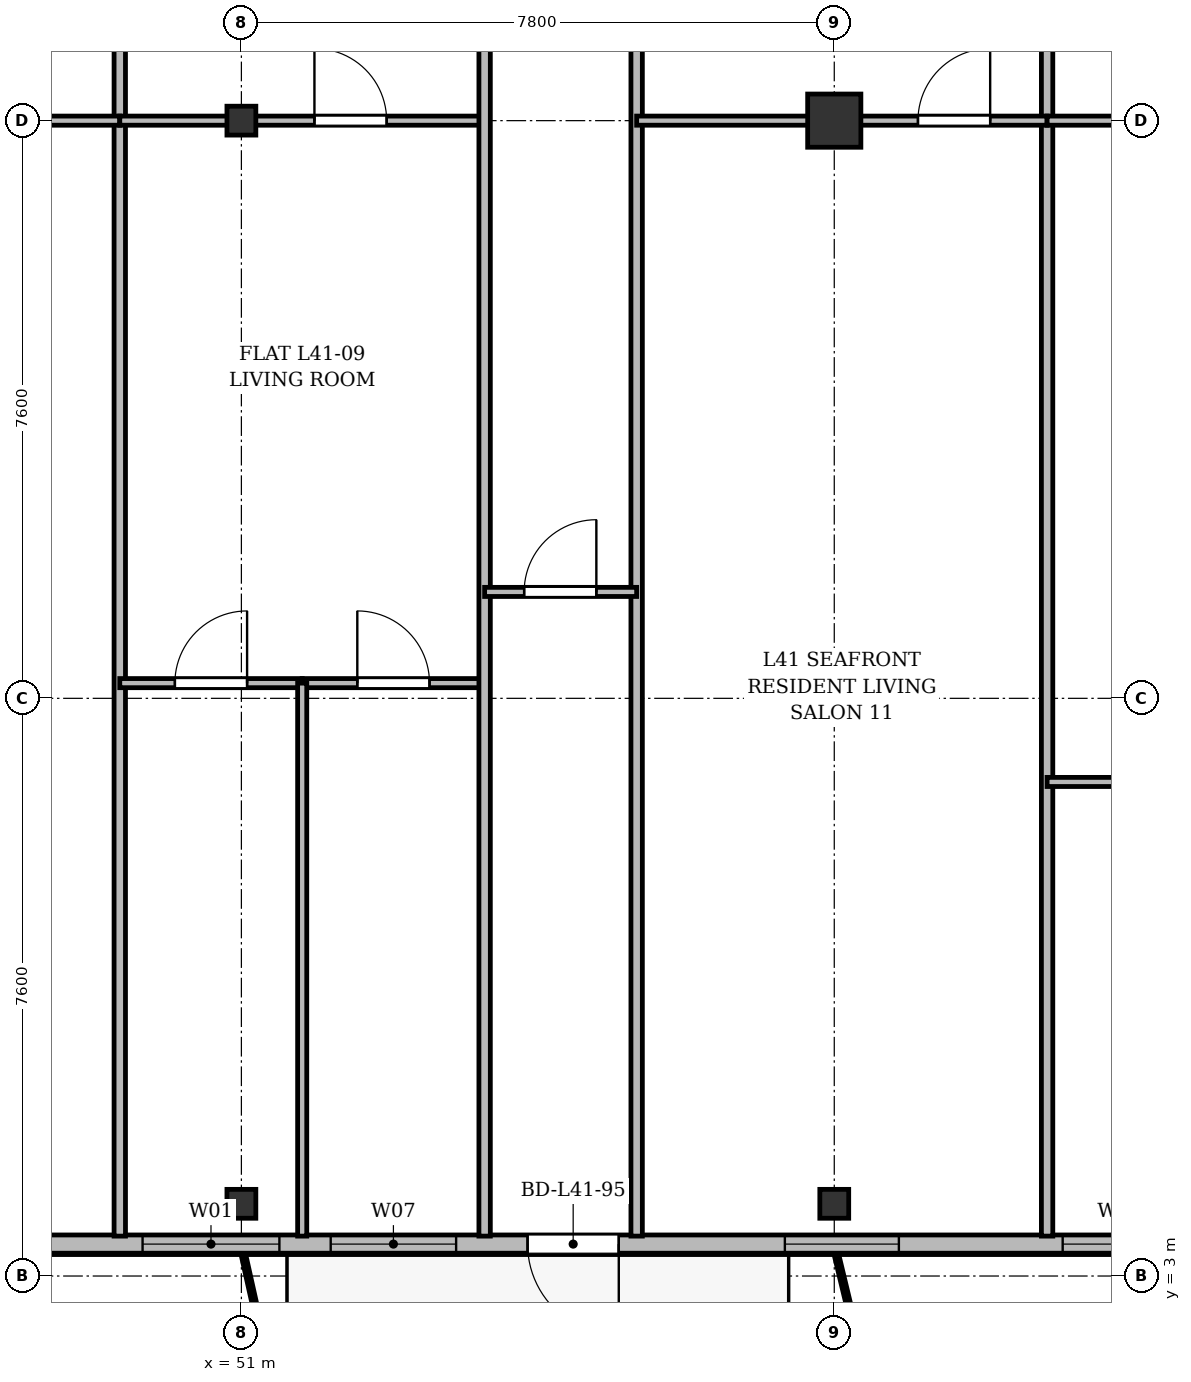
"""IFC4 building model, lengths in metres.
Left out: names, types, materials, properties, quantities, classifications, styles, units other than length and angle.
Written with IfcOpenShell. Run it as: python <this file> out.ifc"""

import sys

from ifc_helpers import new_model, si_unit, direction, frame, frame_2d, origin, origin_2d, place, context, subcontext, project, spatial, rectangle, i_section, extrude, source, transform, mapped, element, fill, save


model = new_model("IFC4")
c1 = context("Model", 3, precision=1e-05, world=origin(), true_north=direction((0.0, 1.0)))
c2 = subcontext(c1, "Body", "Model", "MODEL_VIEW")
j1 = project(units=[si_unit("LENGTHUNIT", "METRE"), si_unit("PLANEANGLEUNIT", "RADIAN")], contexts=[c1])
p1 = place(None, origin())
s1 = spatial("IfcSite", under=j1, at=p1, CompositionType="ELEMENT")
p2 = place(p1, origin())
s2 = spatial("IfcBuilding", under=s1, at=p2, CompositionType="ELEMENT")
p3 = place(p2, frame((0.0, 0.0, 157.3)))
s3 = spatial("IfcBuildingStorey", under=s2, at=p3, CompositionType="ELEMENT", Elevation=157.3)
m1 = source(origin(), c2, "Body", "SweptSolid", [
    extrude(i_section(OverallWidth=0.38, OverallDepth=0.38, WebThickness=0.02, FlangeThickness=0.03, at=origin_2d()), origin(), (0.0, 0.0, 1.0), 3.6),
])
for number, where, z_axis, x_axis in (
    (1, (51.0, 3.95, 0.0), (0.0, 0.0, 1.0), (1.0, 0.0, 0.0)),
    (2, (51.0, 18.2, 0.0), (0.0, 0.0, 1.0), (1.0, 0.0, 0.0)),
    (3, (58.8, 3.95, 0.0), (0.0, 0.0, 1.0), (1.0, 0.0, 0.0)),
):
    element("IfcColumn", number, at=place(p3, frame(where, z_axis=z_axis, x_axis=x_axis)), inside=s3, PredefinedType="COLUMN", context=c2, shape_type="MappedRepresentation", body=[
        mapped(m1, transform((0.0, 0.0, 0.0), x_axis=(1.0, 0.0, 0.0), y_axis=(0.0, 1.0, 0.0), z_axis=(0.0, 0.0, 1.0), scale=1.0)),
    ])
m2 = source(origin(), c2, "Body", "SweptSolid", [
    extrude(rectangle(XDim=0.7, YDim=0.7, at=origin_2d()), origin(), (0.0, 0.0, 1.0), 3.6),
])
p4 = place(p3, frame((58.8, 18.2, 0.0), z_axis=(0.0, 0.0, 1.0), x_axis=(1.0, 0.0, 0.0)))
e4 = element("IfcColumn", 4, at=p4, inside=s3, PredefinedType="COLUMN", context=c2, shape_type="MappedRepresentation", body=[
    mapped(m2, transform((0.0, 0.0, 0.0), x_axis=(1.0, 0.0, 0.0), y_axis=(0.0, 1.0, 0.0), z_axis=(0.0, 0.0, 1.0), scale=1.0)),
])
p5 = place(p3, frame((63.6, 3.42, 0.0), z_axis=(0.0, 0.0, 1.0), x_axis=(-1.0, 0.0, 0.0)))
e5 = element("IfcWall", 5, at=p5, inside=s3, PredefinedType="SOLIDWALL", context=c2, shape_type="SweptSolid", body=[
    extrude(rectangle(XDim=52.8, YDim=0.24, at=frame_2d((26.4, 0.0))), origin(), (0.0, 0.0, 1.0), 3.35),
])
p6 = place(p5, frame((0.295, 0.0, 0.9)))
e6 = element("IfcOpeningElement", 6, at=p6, cuts=e5, PredefinedType="OPENING", context=c2, shape_type="SweptSolid", body=[
    extrude(rectangle(XDim=1.5, YDim=1.75, at=frame_2d((0.75, 0.875))), frame((0.0, 0.13, 0.0), z_axis=(0.0, -1.0, 0.0), x_axis=(1.0, 0.0, 0.0)), (0.0, 0.0, 1.0), 0.26),
])
p7 = place(p5, frame((3.95, 0.0, 0.9)))
e7 = element("IfcOpeningElement", 7, at=p7, cuts=e5, PredefinedType="OPENING", context=c2, shape_type="SweptSolid", body=[
    extrude(rectangle(XDim=1.5, YDim=1.75, at=frame_2d((0.75, 0.875))), frame((0.0, 0.13, 0.0), z_axis=(0.0, -1.0, 0.0), x_axis=(1.0, 0.0, 0.0)), (0.0, 0.0, 1.0), 0.26),
])
p8 = place(p5, frame((7.635, 0.0, 0.0)))
e8 = element("IfcOpeningElement", 8, at=p8, cuts=e5, PredefinedType="OPENING", context=c2, shape_type="SweptSolid", body=[
    extrude(rectangle(XDim=1.2, YDim=2.2, at=frame_2d((0.6, 1.1))), frame((0.0, 0.13, 0.0), z_axis=(0.0, -1.0, 0.0), x_axis=(1.0, 0.0, 0.0)), (0.0, 0.0, 1.0), 0.26),
])
p9 = place(p5, frame((9.775, 0.0, 0.9)))
e9 = element("IfcOpeningElement", 9, at=p9, cuts=e5, PredefinedType="OPENING", context=c2, shape_type="SweptSolid", body=[
    extrude(rectangle(XDim=1.65, YDim=1.85, at=frame_2d((0.825, 0.925))), frame((0.0, 0.13, 0.0), z_axis=(0.0, -1.0, 0.0), x_axis=(1.0, 0.0, 0.0)), (0.0, 0.0, 1.0), 0.26),
])
p10 = place(p5, frame((12.1, 0.0, 0.9)))
e10 = element("IfcOpeningElement", 10, at=p10, cuts=e5, PredefinedType="OPENING", context=c2, shape_type="SweptSolid", body=[
    extrude(rectangle(XDim=1.8, YDim=1.8, at=frame_2d((0.9, 0.9))), frame((0.0, 0.13, 0.0), z_axis=(0.0, -1.0, 0.0), x_axis=(1.0, 0.0, 0.0)), (0.0, 0.0, 1.0), 0.26),
])
p11 = place(p5, frame((15.9, 0.0, 0.9)))
e11 = element("IfcOpeningElement", 11, at=p11, cuts=e5, PredefinedType="OPENING", context=c2, shape_type="SweptSolid", body=[
    extrude(rectangle(XDim=2.2, YDim=1.8, at=frame_2d((1.1, 0.9))), frame((0.0, 0.13, 0.0), z_axis=(0.0, -1.0, 0.0), x_axis=(1.0, 0.0, 0.0)), (0.0, 0.0, 1.0), 0.26),
])
p12 = place(p5, frame((22.65, 0.0, 0.9)))
e12 = element("IfcOpeningElement", 12, at=p12, cuts=e5, PredefinedType="OPENING", context=c2, shape_type="SweptSolid", body=[
    extrude(rectangle(XDim=1.5, YDim=1.75, at=frame_2d((0.75, 0.875))), frame((0.0, 0.13, 0.0), z_axis=(0.0, -1.0, 0.0), x_axis=(1.0, 0.0, 0.0)), (0.0, 0.0, 1.0), 0.26),
])
p13 = place(p5, frame((27.5, 0.0, 0.9)))
e13 = element("IfcOpeningElement", 13, at=p13, cuts=e5, PredefinedType="OPENING", context=c2, shape_type="SweptSolid", body=[
    extrude(rectangle(XDim=2.0, YDim=1.95, at=frame_2d((1.0, 0.975))), frame((0.0, 0.13, 0.0), z_axis=(0.0, -1.0, 0.0), x_axis=(1.0, 0.0, 0.0)), (0.0, 0.0, 1.0), 0.26),
])
p14 = place(p5, frame((30.675, 0.0, 0.9)))
e14 = element("IfcOpeningElement", 14, at=p14, cuts=e5, PredefinedType="OPENING", context=c2, shape_type="SweptSolid", body=[
    extrude(rectangle(XDim=1.65, YDim=1.85, at=frame_2d((0.825, 0.925))), frame((0.0, 0.13, 0.0), z_axis=(0.0, -1.0, 0.0), x_axis=(1.0, 0.0, 0.0)), (0.0, 0.0, 1.0), 0.26),
])
p15 = place(p5, frame((34.3, 0.0, 0.9)))
e15 = element("IfcOpeningElement", 15, at=p15, cuts=e5, PredefinedType="OPENING", context=c2, shape_type="SweptSolid", body=[
    extrude(rectangle(XDim=1.8, YDim=1.8, at=frame_2d((0.9, 0.9))), frame((0.0, 0.13, 0.0), z_axis=(0.0, -1.0, 0.0), x_axis=(1.0, 0.0, 0.0)), (0.0, 0.0, 1.0), 0.26),
])
p16 = place(p5, frame((39.3, 0.0, 0.9)))
e16 = element("IfcOpeningElement", 16, at=p16, cuts=e5, PredefinedType="OPENING", context=c2, shape_type="SweptSolid", body=[
    extrude(rectangle(XDim=2.2, YDim=1.8, at=frame_2d((1.1, 0.9))), frame((0.0, 0.13, 0.0), z_axis=(0.0, -1.0, 0.0), x_axis=(1.0, 0.0, 0.0)), (0.0, 0.0, 1.0), 0.26),
])
p17 = place(p5, frame((43.65, 0.0, 0.9)))
e17 = element("IfcOpeningElement", 17, at=p17, cuts=e5, PredefinedType="OPENING", context=c2, shape_type="SweptSolid", body=[
    extrude(rectangle(XDim=1.5, YDim=1.75, at=frame_2d((0.75, 0.875))), frame((0.0, 0.13, 0.0), z_axis=(0.0, -1.0, 0.0), x_axis=(1.0, 0.0, 0.0)), (0.0, 0.0, 1.0), 0.26),
])
p18 = place(p5, frame((47.1, 0.0, 0.9)))
e18 = element("IfcOpeningElement", 18, at=p18, cuts=e5, PredefinedType="OPENING", context=c2, shape_type="SweptSolid", body=[
    extrude(rectangle(XDim=2.0, YDim=1.95, at=frame_2d((1.0, 0.975))), frame((0.0, 0.13, 0.0), z_axis=(0.0, -1.0, 0.0), x_axis=(1.0, 0.0, 0.0)), (0.0, 0.0, 1.0), 0.26),
])
p19 = place(p5, frame((51.005, 0.0, 0.9)))
e19 = element("IfcOpeningElement", 19, at=p19, cuts=e5, PredefinedType="OPENING", context=c2, shape_type="SweptSolid", body=[
    extrude(rectangle(XDim=1.5, YDim=1.75, at=frame_2d((0.75, 0.875))), frame((0.0, 0.13, 0.0), z_axis=(0.0, -1.0, 0.0), x_axis=(1.0, 0.0, 0.0)), (0.0, 0.0, 1.0), 0.26),
])
p20 = place(p5, frame((37.85, 0.0, 0.0)))
e20 = element("IfcOpeningElement", 20, at=p20, cuts=e5, PredefinedType="OPENING", context=c2, shape_type="SweptSolid", body=[
    extrude(rectangle(XDim=1.2, YDim=2.2, at=frame_2d((0.6, 1.1))), frame((0.0, 0.13, 0.0), z_axis=(0.0, -1.0, 0.0), x_axis=(1.0, 0.0, 0.0)), (0.0, 0.0, 1.0), 0.26),
])
for number, where, z_axis, x_axis in (
    (21, (49.4, 3.525, 0.0), (0.0, 0.0, 1.0), (0.0, 1.0, 0.0)),
    (22, (61.6, 3.525, 0.0), (0.0, 0.0, 1.0), (0.0, 1.0, 0.0)),
):
    element("IfcWall", number, at=place(p3, frame(where, z_axis=z_axis, x_axis=x_axis)), inside=s3, PredefinedType="PARTITIONING", context=c2, shape_type="SweptSolid", body=[
        extrude(rectangle(XDim=27.275, YDim=0.15, at=frame_2d((13.638, 0.0))), origin(), (0.0, 0.0, 1.0), 2.75),
    ])
p21 = place(p3, frame((43.8, 18.2, 0.0), z_axis=(0.0, 0.0, 1.0), x_axis=(1.0, 0.0, 0.0)))
e23 = element("IfcWall", 23, at=p21, inside=s3, PredefinedType="PARTITIONING", context=c2, shape_type="SweptSolid", body=[
    extrude(rectangle(XDim=5.6, YDim=0.12, at=frame_2d((2.8, 0.0))), origin(), (0.0, 0.0, 1.0), 2.75),
])
p22 = place(p21, frame((2.418, 0.0, 0.0)))
e24 = element("IfcOpeningElement", 24, at=p22, cuts=e23, PredefinedType="OPENING", context=c2, shape_type="SweptSolid", body=[
    extrude(rectangle(XDim=0.95, YDim=2.15, at=frame_2d((0.475, 1.075))), frame((0.0, 0.07, 0.0), z_axis=(0.0, -1.0, 0.0), x_axis=(1.0, 0.0, 0.0)), (0.0, 0.0, 1.0), 0.14),
])
p23 = place(p3, frame((49.4, 18.2, 0.0), z_axis=(0.0, 0.0, 1.0), x_axis=(1.0, 0.0, 0.0)))
e25 = element("IfcWall", 25, at=p23, inside=s3, PredefinedType="PARTITIONING", context=c2, shape_type="SweptSolid", body=[
    extrude(rectangle(XDim=4.8, YDim=0.12, at=frame_2d((2.4, 0.0))), origin(), (0.0, 0.0, 1.0), 2.75),
])
p24 = place(p23, frame((2.561, 0.0, 0.0)))
e26 = element("IfcOpeningElement", 26, at=p24, cuts=e25, PredefinedType="OPENING", context=c2, shape_type="SweptSolid", body=[
    extrude(rectangle(XDim=0.95, YDim=2.15, at=frame_2d((0.475, 1.075))), frame((0.0, 0.07, 0.0), z_axis=(0.0, -1.0, 0.0), x_axis=(1.0, 0.0, 0.0)), (0.0, 0.0, 1.0), 0.14),
])
p25 = place(p3, frame((49.4, 10.8, 0.0), z_axis=(0.0, 0.0, 1.0), x_axis=(1.0, 0.0, 0.0)))
e27 = element("IfcWall", 27, at=p25, inside=s3, PredefinedType="PARTITIONING", context=c2, shape_type="SweptSolid", body=[
    extrude(rectangle(XDim=2.4, YDim=0.12, at=frame_2d((1.2, 0.0))), origin(), (0.0, 0.0, 1.0), 2.85),
])
p26 = place(p25, frame((0.725, 0.0, 0.0)))
e28 = element("IfcOpeningElement", 28, at=p26, cuts=e27, PredefinedType="OPENING", context=c2, shape_type="SweptSolid", body=[
    extrude(rectangle(XDim=0.95, YDim=2.15, at=frame_2d((0.475, 1.075))), frame((0.0, 0.07, 0.0), z_axis=(0.0, -1.0, 0.0), x_axis=(1.0, 0.0, 0.0)), (0.0, 0.0, 1.0), 0.14),
])
p27 = place(p3, frame((51.8, 10.8, 0.0), z_axis=(0.0, 0.0, 1.0), x_axis=(1.0, 0.0, 0.0)))
e29 = element("IfcWall", 29, at=p27, inside=s3, PredefinedType="PARTITIONING", context=c2, shape_type="SweptSolid", body=[
    extrude(rectangle(XDim=2.4, YDim=0.12, at=frame_2d((1.2, 0.0))), origin(), (0.0, 0.0, 1.0), 3.35),
])
p28 = place(p27, frame((0.725, 0.0, 0.0)))
e30 = element("IfcOpeningElement", 30, at=p28, cuts=e29, PredefinedType="OPENING", context=c2, shape_type="SweptSolid", body=[
    extrude(rectangle(XDim=0.95, YDim=2.15, at=frame_2d((0.475, 1.075))), frame((0.0, 0.07, 0.0), z_axis=(0.0, -1.0, 0.0), x_axis=(1.0, 0.0, 0.0)), (0.0, 0.0, 1.0), 0.14),
])
p29 = place(p3, frame((51.8, 3.525, 0.0), z_axis=(0.0, 0.0, 1.0), x_axis=(0.0, 1.0, 0.0)))
e31 = element("IfcWall", 31, at=p29, inside=s3, PredefinedType="PARTITIONING", context=c2, shape_type="SweptSolid", body=[
    extrude(rectangle(XDim=7.275, YDim=0.12, at=frame_2d((3.638, 0.0))), origin(), (0.0, 0.0, 1.0), 2.75),
])
for number, where, z_axis, x_axis in (
    (32, (54.2, 3.525, 0.0), (0.0, 0.0, 1.0), (0.0, 1.0, 0.0)),
    (33, (56.2, 3.525, 0.0), (0.0, 0.0, 1.0), (0.0, 1.0, 0.0)),
):
    element("IfcWall", number, at=place(p3, frame(where, z_axis=z_axis, x_axis=x_axis)), inside=s3, PredefinedType="PARTITIONING", context=c2, shape_type="SweptSolid", body=[
        extrude(rectangle(XDim=27.275, YDim=0.15, at=frame_2d((13.638, 0.0))), origin(), (0.0, 0.0, 1.0), 2.75),
    ])
p30 = place(p3, frame((54.2, 12.0, 0.0), z_axis=(0.0, 0.0, 1.0), x_axis=(1.0, 0.0, 0.0)))
e34 = element("IfcWall", 34, at=p30, inside=s3, PredefinedType="PARTITIONING", context=c2, shape_type="SweptSolid", body=[
    extrude(rectangle(XDim=2.0, YDim=0.12, at=frame_2d((1.0, 0.0))), origin(), (0.0, 0.0, 1.0), 3.35),
])
p31 = place(p30, frame((0.52, 0.0, 0.0)))
e35 = element("IfcOpeningElement", 35, at=p31, cuts=e34, PredefinedType="OPENING", context=c2, shape_type="SweptSolid", body=[
    extrude(rectangle(XDim=0.95, YDim=2.15, at=frame_2d((0.475, 1.075))), frame((0.0, 0.07, 0.0), z_axis=(0.0, -1.0, 0.0), x_axis=(1.0, 0.0, 0.0)), (0.0, 0.0, 1.0), 0.14),
])
p32 = place(p3, frame((56.2, 18.2, 0.0), z_axis=(0.0, 0.0, 1.0), x_axis=(1.0, 0.0, 0.0)))
e36 = element("IfcWall", 36, at=p32, inside=s3, PredefinedType="PARTITIONING", context=c2, shape_type="SweptSolid", body=[
    extrude(rectangle(XDim=5.4, YDim=0.12, at=frame_2d((2.7, 0.0))), origin(), (0.0, 0.0, 1.0), 2.75),
])
p33 = place(p32, frame((3.701, 0.0, 0.0)))
e37 = element("IfcOpeningElement", 37, at=p33, cuts=e36, PredefinedType="OPENING", context=c2, shape_type="SweptSolid", body=[
    extrude(rectangle(XDim=0.95, YDim=2.15, at=frame_2d((0.475, 1.075))), frame((0.0, 0.07, 0.0), z_axis=(0.0, -1.0, 0.0), x_axis=(1.0, 0.0, 0.0)), (0.0, 0.0, 1.0), 0.14),
])
p34 = place(p3, frame((61.6, 18.2, 0.0), z_axis=(0.0, 0.0, 1.0), x_axis=(1.0, 0.0, 0.0)))
e38 = element("IfcWall", 38, at=p34, inside=s3, PredefinedType="PARTITIONING", context=c2, shape_type="SweptSolid", body=[
    extrude(rectangle(XDim=4.76, YDim=0.12, at=frame_2d((2.38, 0.0))), origin(), (0.0, 0.0, 1.0), 2.75),
])
p35 = place(p34, frame((1.905, 0.0, 0.0)))
e39 = element("IfcOpeningElement", 39, at=p35, cuts=e38, PredefinedType="OPENING", context=c2, shape_type="SweptSolid", body=[
    extrude(rectangle(XDim=0.95, YDim=2.15, at=frame_2d((0.475, 1.075))), frame((0.0, 0.07, 0.0), z_axis=(0.0, -1.0, 0.0), x_axis=(1.0, 0.0, 0.0)), (0.0, 0.0, 1.0), 0.14),
])
p36 = place(p3, frame((61.6, 9.5, 0.0), z_axis=(0.0, 0.0, 1.0), x_axis=(1.0, 0.0, 0.0)))
e40 = element("IfcWall", 40, at=p36, inside=s3, PredefinedType="PARTITIONING", context=c2, shape_type="SweptSolid", body=[
    extrude(rectangle(XDim=4.76, YDim=0.12, at=frame_2d((2.38, 0.0))), origin(), (0.0, 0.0, 1.0), 2.85),
])
p37 = place(p36, frame((1.905, 0.0, 0.0)))
e41 = element("IfcOpeningElement", 41, at=p37, cuts=e40, PredefinedType="OPENING", context=c2, shape_type="SweptSolid", body=[
    extrude(rectangle(XDim=0.95, YDim=2.15, at=frame_2d((0.475, 1.075))), frame((0.0, 0.07, 0.0), z_axis=(0.0, -1.0, 0.0), x_axis=(1.0, 0.0, 0.0)), (0.0, 0.0, 1.0), 0.14),
])
m3 = source(origin(), c2, "Body", "SweptSolid", [
    extrude(rectangle(XDim=1.5, YDim=1.75, at=frame_2d((0.75, 0.875))), frame((0.0, 0.03, 0.0), z_axis=(0.0, -1.0, 0.0), x_axis=(1.0, 0.0, 0.0)), (0.0, 0.0, 1.0), 0.06),
])
p38 = place(p6, origin())
e42 = element("IfcWindow", 42, at=p38, inside=s3, PartitioningType="SINGLE_PANEL", PredefinedType="WINDOW", context=c2, shape_type="MappedRepresentation", body=[
    mapped(m3, transform((0.0, 0.0, 0.0), x_axis=(1.0, 0.0, 0.0), y_axis=(0.0, 1.0, 0.0), z_axis=(0.0, 0.0, 1.0), scale=1.0)),
])
fill(e6, e42)
p39 = place(p7, origin())
e43 = element("IfcWindow", 43, at=p39, inside=s3, PartitioningType="SINGLE_PANEL", PredefinedType="WINDOW", context=c2, shape_type="MappedRepresentation", body=[
    mapped(m3, transform((0.0, 0.0, 0.0), x_axis=(1.0, 0.0, 0.0), y_axis=(0.0, 1.0, 0.0), z_axis=(0.0, 0.0, 1.0), scale=1.0)),
])
fill(e7, e43)
m4 = source(origin(), c2, "Body", "SweptSolid", [
    extrude(rectangle(XDim=1.2, YDim=2.2, at=frame_2d((0.6, 1.1))), frame((0.0, 0.025, 0.0), z_axis=(0.0, -1.0, 0.0), x_axis=(1.0, 0.0, 0.0)), (0.0, 0.0, 1.0), 0.05),
])
p40 = place(p8, origin())
e44 = element("IfcDoor", 44, at=p40, inside=s3, OperationType="SINGLE_SWING_LEFT", PredefinedType="DOOR", context=c2, shape_type="MappedRepresentation", body=[
    mapped(m4, transform((0.0, 0.0, 0.0), x_axis=(1.0, 0.0, 0.0), y_axis=(0.0, 1.0, 0.0), z_axis=(0.0, 0.0, 1.0), scale=1.0)),
])
fill(e8, e44)
m5 = source(origin(), c2, "Body", "SweptSolid", [
    extrude(rectangle(XDim=1.65, YDim=1.85, at=frame_2d((0.825, 0.925))), frame((0.0, 0.03, 0.0), z_axis=(0.0, -1.0, 0.0), x_axis=(1.0, 0.0, 0.0)), (0.0, 0.0, 1.0), 0.06),
])
p41 = place(p9, origin())
e45 = element("IfcWindow", 45, at=p41, inside=s3, PartitioningType="SINGLE_PANEL", PredefinedType="WINDOW", context=c2, shape_type="MappedRepresentation", body=[
    mapped(m5, transform((0.0, 0.0, 0.0), x_axis=(1.0, 0.0, 0.0), y_axis=(0.0, 1.0, 0.0), z_axis=(0.0, 0.0, 1.0), scale=1.0)),
])
fill(e9, e45)
m6 = source(origin(), c2, "Body", "SweptSolid", [
    extrude(rectangle(XDim=1.8, YDim=1.8, at=frame_2d((0.9, 0.9))), frame((0.0, 0.03, 0.0), z_axis=(0.0, -1.0, 0.0), x_axis=(1.0, 0.0, 0.0)), (0.0, 0.0, 1.0), 0.06),
])
p42 = place(p10, origin())
e46 = element("IfcWindow", 46, at=p42, inside=s3, PartitioningType="SINGLE_PANEL", PredefinedType="WINDOW", context=c2, shape_type="MappedRepresentation", body=[
    mapped(m6, transform((0.0, 0.0, 0.0), x_axis=(1.0, 0.0, 0.0), y_axis=(0.0, 1.0, 0.0), z_axis=(0.0, 0.0, 1.0), scale=1.0)),
])
fill(e10, e46)
m7 = source(origin(), c2, "Body", "SweptSolid", [
    extrude(rectangle(XDim=0.95, YDim=2.15, at=frame_2d((0.475, 1.075))), frame((0.0, 0.025, 0.0), z_axis=(0.0, -1.0, 0.0), x_axis=(1.0, 0.0, 0.0)), (0.0, 0.0, 1.0), 0.05),
])
p43 = place(p24, origin())
e47 = element("IfcDoor", 47, at=p43, inside=s3, OperationType="SINGLE_SWING_LEFT", PredefinedType="DOOR", context=c2, shape_type="MappedRepresentation", body=[
    mapped(m7, transform((0.0, 0.0, 0.0), x_axis=(1.0, 0.0, 0.0), y_axis=(0.0, 1.0, 0.0), z_axis=(0.0, 0.0, 1.0), scale=1.0)),
])
fill(e26, e47)
p44 = place(p26, origin())
e48 = element("IfcDoor", 48, at=p44, inside=s3, OperationType="SINGLE_SWING_RIGHT", PredefinedType="DOOR", context=c2, shape_type="MappedRepresentation", body=[
    mapped(m7, transform((0.0, 0.0, 0.0), x_axis=(1.0, 0.0, 0.0), y_axis=(0.0, 1.0, 0.0), z_axis=(0.0, 0.0, 1.0), scale=1.0)),
])
fill(e28, e48)
p45 = place(p28, origin())
e49 = element("IfcDoor", 49, at=p45, inside=s3, OperationType="SINGLE_SWING_LEFT", PredefinedType="DOOR", context=c2, shape_type="MappedRepresentation", body=[
    mapped(m7, transform((0.0, 0.0, 0.0), x_axis=(1.0, 0.0, 0.0), y_axis=(0.0, 1.0, 0.0), z_axis=(0.0, 0.0, 1.0), scale=1.0)),
])
fill(e30, e49)
p46 = place(p31, origin())
e50 = element("IfcDoor", 50, at=p46, inside=s3, OperationType="SINGLE_SWING_RIGHT", PredefinedType="DOOR", context=c2, shape_type="MappedRepresentation", body=[
    mapped(m7, transform((0.0, 0.0, 0.0), x_axis=(1.0, 0.0, 0.0), y_axis=(0.0, 1.0, 0.0), z_axis=(0.0, 0.0, 1.0), scale=1.0)),
])
fill(e35, e50)
p47 = place(p33, origin())
e51 = element("IfcDoor", 51, at=p47, inside=s3, OperationType="SINGLE_SWING_RIGHT", PredefinedType="DOOR", context=c2, shape_type="MappedRepresentation", body=[
    mapped(m7, transform((0.0, 0.0, 0.0), x_axis=(1.0, 0.0, 0.0), y_axis=(0.0, 1.0, 0.0), z_axis=(0.0, 0.0, 1.0), scale=1.0)),
])
fill(e37, e51)
save(model, sys.argv[1])
